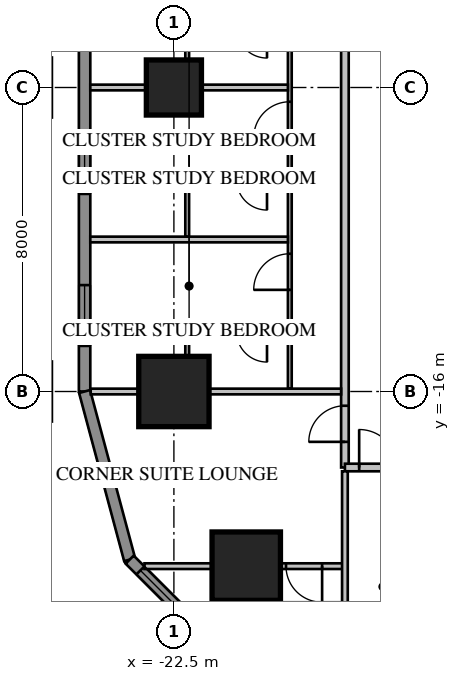
"""IFC4 building model, lengths in metres.
Left out: names, types, materials, properties, quantities, classifications, styles, units other than length and angle.
Written with IfcOpenShell. Run it as: python <this file> out.ifc"""

import sys

from ifc_helpers import new_model, si_unit, direction, frame, frame_2d, origin, origin_2d, place, context, subcontext, project, spatial, rectangle, extrude, element, fill, save


model = new_model("IFC4")
c1 = context("Model", 3, precision=1e-05, world=origin(), true_north=direction((0.0, 1.0)))
c2 = subcontext(c1, "Body", "Model", "MODEL_VIEW")
j1 = project(units=[si_unit("LENGTHUNIT", "METRE"), si_unit("PLANEANGLEUNIT", "RADIAN")], contexts=[c1])
p1 = place(None, origin())
s1 = spatial("IfcSite", under=j1, at=p1, CompositionType="ELEMENT")
p2 = place(p1, origin())
s2 = spatial("IfcBuilding", under=s1, at=p2, CompositionType="ELEMENT")
p3 = place(p2, frame((0.0, 0.0, 23.7)))
s3 = spatial("IfcBuildingStorey", under=s2, at=p3, CompositionType="ELEMENT", Elevation=23.7)
p4 = place(p3, frame((-22.5, -8.0, 0.0), z_axis=(0.0, 0.0, 1.0), x_axis=(1.0, 0.0, 0.0)))
e1 = element("IfcColumn", 1, at=p4, inside=s3, PredefinedType="COLUMN", context=c2, shape_type="SweptSolid", body=[
    extrude(rectangle(XDim=1.45, YDim=1.45, at=origin_2d()), origin(), (0.0, 0.0, 1.0), 3.85),
])
p5 = place(p3, frame((-22.5, -16.0, 0.0), z_axis=(0.0, 0.0, 1.0), x_axis=(1.0, 0.0, 0.0)))
e2 = element("IfcColumn", 2, at=p5, inside=s3, PredefinedType="COLUMN", context=c2, shape_type="SweptSolid", body=[
    extrude(rectangle(XDim=1.85, YDim=1.85, at=origin_2d()), origin(), (0.0, 0.0, 1.0), 3.85),
])
p6 = place(p3, frame((-20.596, -20.596, 0.0), z_axis=(0.0, 0.0, 1.0), x_axis=(1.0, 0.0, 0.0)))
e3 = element("IfcColumn", 3, at=p6, inside=s3, PredefinedType="COLUMN", context=c2, shape_type="SweptSolid", body=[
    extrude(rectangle(XDim=1.8, YDim=1.8, at=origin_2d()), origin(), (0.0, 0.0, 1.0), 3.85),
])
p7 = place(p3, frame((-24.85, 16.0, 0.0), z_axis=(0.0, 0.0, 1.0), x_axis=(0.0, -1.0, 0.0)))
e4 = element("IfcWall", 4, at=p7, inside=s3, PredefinedType="SOLIDWALL", context=c2, shape_type="SweptSolid", body=[
    extrude(rectangle(XDim=32.0, YDim=0.3, at=frame_2d((16.0, 0.0))), origin(), (0.0, 0.0, 1.0), 3.65),
])
p8 = place(p7, frame((1.2, 0.0, 0.75)))
e5 = element("IfcOpeningElement", 5, at=p8, cuts=e4, PredefinedType="OPENING", context=c2, shape_type="SweptSolid", body=[
    extrude(rectangle(XDim=1.6, YDim=1.8, at=frame_2d((0.8, 0.9))), frame((0.0, 0.17, 0.0), z_axis=(0.0, -1.0, 0.0), x_axis=(1.0, 0.0, 0.0)), (0.0, 0.0, 1.0), 0.34),
])
p9 = place(p7, frame((5.2, 0.0, 0.75)))
e6 = element("IfcOpeningElement", 6, at=p9, cuts=e4, PredefinedType="OPENING", context=c2, shape_type="SweptSolid", body=[
    extrude(rectangle(XDim=1.6, YDim=1.8, at=frame_2d((0.8, 0.9))), frame((0.0, 0.17, 0.0), z_axis=(0.0, -1.0, 0.0), x_axis=(1.0, 0.0, 0.0)), (0.0, 0.0, 1.0), 0.34),
])
p10 = place(p7, frame((17.2, 0.0, 0.75)))
e7 = element("IfcOpeningElement", 7, at=p10, cuts=e4, PredefinedType="OPENING", context=c2, shape_type="SweptSolid", body=[
    extrude(rectangle(XDim=1.6, YDim=1.8, at=frame_2d((0.8, 0.9))), frame((0.0, 0.17, 0.0), z_axis=(0.0, -1.0, 0.0), x_axis=(1.0, 0.0, 0.0)), (0.0, 0.0, 1.0), 0.34),
])
p11 = place(p7, frame((21.2, 0.0, 0.75)))
e8 = element("IfcOpeningElement", 8, at=p11, cuts=e4, PredefinedType="OPENING", context=c2, shape_type="SweptSolid", body=[
    extrude(rectangle(XDim=1.6, YDim=1.8, at=frame_2d((0.8, 0.9))), frame((0.0, 0.17, 0.0), z_axis=(0.0, -1.0, 0.0), x_axis=(1.0, 0.0, 0.0)), (0.0, 0.0, 1.0), 0.34),
])
p12 = place(p7, frame((25.2, 0.0, 0.75)))
e9 = element("IfcOpeningElement", 9, at=p12, cuts=e4, PredefinedType="OPENING", context=c2, shape_type="SweptSolid", body=[
    extrude(rectangle(XDim=1.6, YDim=1.8, at=frame_2d((0.8, 0.9))), frame((0.0, 0.17, 0.0), z_axis=(0.0, -1.0, 0.0), x_axis=(1.0, 0.0, 0.0)), (0.0, 0.0, 1.0), 0.34),
])
p13 = place(p7, frame((29.2, 0.0, 0.75)))
e10 = element("IfcOpeningElement", 10, at=p13, cuts=e4, PredefinedType="OPENING", context=c2, shape_type="SweptSolid", body=[
    extrude(rectangle(XDim=1.6, YDim=1.8, at=frame_2d((0.8, 0.9))), frame((0.0, 0.17, 0.0), z_axis=(0.0, -1.0, 0.0), x_axis=(1.0, 0.0, 0.0)), (0.0, 0.0, 1.0), 0.34),
])
p14 = place(p7, frame((8.8, 0.0, 0.75)))
e11 = element("IfcOpeningElement", 11, at=p14, cuts=e4, PredefinedType="OPENING", context=c2, shape_type="SweptSolid", body=[
    extrude(rectangle(XDim=2.4, YDim=1.8, at=frame_2d((1.2, 0.9))), frame((0.0, 0.17, 0.0), z_axis=(0.0, -1.0, 0.0), x_axis=(1.0, 0.0, 0.0)), (0.0, 0.0, 1.0), 0.34),
])
p15 = place(p7, frame((13.812, 0.0, 0.0)))
e12 = element("IfcOpeningElement", 12, at=p15, cuts=e4, PredefinedType="OPENING", context=c2, shape_type="SweptSolid", body=[
    extrude(rectangle(XDim=1.0, YDim=2.4, at=frame_2d((0.5, 1.2))), frame((0.0, 0.17, 0.0), z_axis=(0.0, -1.0, 0.0), x_axis=(1.0, 0.0, 0.0)), (0.0, 0.0, 1.0), 0.34),
])
p16 = place(p3, frame((-24.85, -16.0, 0.0), z_axis=(0.0, 0.0, 1.0), x_axis=(0.258839972501, -0.965920218567, 0.0)))
e13 = element("IfcWall", 13, at=p16, inside=s3, PredefinedType="SOLIDWALL", context=c2, shape_type="SweptSolid", body=[
    extrude(rectangle(XDim=4.581, YDim=0.3, at=frame_2d((2.291, 0.0))), origin(), (0.0, 0.0, 1.0), 3.65),
])
p17 = place(p3, frame((-23.664, -20.425, 0.0), z_axis=(0.0, 0.0, 1.0), x_axis=(0.707106781187, -0.707106781187, 0.0)))
e14 = element("IfcWall", 14, at=p17, inside=s3, PredefinedType="SOLIDWALL", context=c2, shape_type="SweptSolid", body=[
    extrude(rectangle(XDim=4.581, YDim=0.3, at=frame_2d((2.291, 0.0))), origin(), (0.0, 0.0, 1.0), 3.65),
])
p18 = place(p17, frame((0.4, 0.0, 0.75)))
e15 = element("IfcOpeningElement", 15, at=p18, cuts=e14, PredefinedType="OPENING", context=c2, shape_type="SweptSolid", body=[
    extrude(rectangle(XDim=3.781, YDim=1.8, at=frame_2d((1.891, 0.9))), frame((0.0, 0.17, 0.0), z_axis=(0.0, -1.0, 0.0), x_axis=(1.0, 0.0, 0.0)), (0.0, 0.0, 1.0), 0.34),
])
p19 = place(p3, frame((-18.0, 18.0, 0.0), z_axis=(0.0, 0.0, 1.0), x_axis=(0.0, -1.0, 0.0)))
e16 = element("IfcWall", 16, at=p19, inside=s3, PredefinedType="PARTITIONING", context=c2, shape_type="SweptSolid", body=[
    extrude(rectangle(XDim=36.0, YDim=0.2, at=frame_2d((18.0, 0.0))), origin(), (0.0, 0.0, 1.0), 3.65),
])
p20 = place(p19, frame((10.4, 0.0, 0.0)))
e17 = element("IfcOpeningElement", 17, at=p20, cuts=e16, PredefinedType="OPENING", context=c2, shape_type="SweptSolid", body=[
    extrude(rectangle(XDim=1.0, YDim=2.1, at=frame_2d((0.5, 1.05))), frame((0.0, 0.12, 0.0), z_axis=(0.0, -1.0, 0.0), x_axis=(1.0, 0.0, 0.0)), (0.0, 0.0, 1.0), 0.24),
])
p21 = place(p19, frame((14.4, 0.0, 0.0)))
e18 = element("IfcOpeningElement", 18, at=p21, cuts=e16, PredefinedType="OPENING", context=c2, shape_type="SweptSolid", body=[
    extrude(rectangle(XDim=1.0, YDim=2.1, at=frame_2d((0.5, 1.05))), frame((0.0, 0.12, 0.0), z_axis=(0.0, -1.0, 0.0), x_axis=(1.0, 0.0, 0.0)), (0.0, 0.0, 1.0), 0.24),
])
p22 = place(p19, frame((0.375, 0.0, 0.0)))
e19 = element("IfcOpeningElement", 19, at=p22, cuts=e16, PredefinedType="OPENING", context=c2, shape_type="SweptSolid", body=[
    extrude(rectangle(XDim=1.0, YDim=2.1, at=frame_2d((0.5, 1.05))), frame((0.0, 0.12, 0.0), z_axis=(0.0, -1.0, 0.0), x_axis=(1.0, 0.0, 0.0)), (0.0, 0.0, 1.0), 0.24),
])
p23 = place(p19, frame((34.375, 0.0, 0.0)))
e20 = element("IfcOpeningElement", 20, at=p23, cuts=e16, PredefinedType="OPENING", context=c2, shape_type="SweptSolid", body=[
    extrude(rectangle(XDim=0.95, YDim=2.1, at=frame_2d((0.475, 1.05))), frame((0.0, 0.12, 0.0), z_axis=(0.0, -1.0, 0.0), x_axis=(1.0, 0.0, 0.0)), (0.0, 0.0, 1.0), 0.24),
])
p24 = place(p3, frame((-19.45, 3.925, 0.0), z_axis=(0.0, 0.0, 1.0), x_axis=(0.0, -1.0, 0.0)))
e21 = element("IfcWall", 21, at=p24, inside=s3, PredefinedType="PARTITIONING", context=c2, shape_type="SweptSolid", body=[
    extrude(rectangle(XDim=19.85, YDim=0.1, at=frame_2d((9.925, 0.0))), origin(), (0.0, 0.0, 1.0), 3.65),
])
p25 = place(p24, frame((2.125, 0.0, 0.0)))
e22 = element("IfcOpeningElement", 22, at=p25, cuts=e21, PredefinedType="OPENING", context=c2, shape_type="SweptSolid", body=[
    extrude(rectangle(XDim=1.0, YDim=2.1, at=frame_2d((0.5, 1.05))), frame((0.0, 0.07, 0.0), z_axis=(0.0, -1.0, 0.0), x_axis=(1.0, 0.0, 0.0)), (0.0, 0.0, 1.0), 0.14),
])
p26 = place(p24, frame((0.3, 0.0, 0.0)))
e23 = element("IfcOpeningElement", 23, at=p26, cuts=e21, PredefinedType="OPENING", context=c2, shape_type="SweptSolid", body=[
    extrude(rectangle(XDim=0.8, YDim=2.1, at=frame_2d((0.4, 1.05))), frame((0.0, 0.07, 0.0), z_axis=(0.0, -1.0, 0.0), x_axis=(1.0, 0.0, 0.0)), (0.0, 0.0, 1.0), 0.14),
])
p27 = place(p24, frame((4.3, 0.0, 0.0)))
e24 = element("IfcOpeningElement", 24, at=p27, cuts=e21, PredefinedType="OPENING", context=c2, shape_type="SweptSolid", body=[
    extrude(rectangle(XDim=0.95, YDim=2.1, at=frame_2d((0.475, 1.05))), frame((0.0, 0.07, 0.0), z_axis=(0.0, -1.0, 0.0), x_axis=(1.0, 0.0, 0.0)), (0.0, 0.0, 1.0), 0.14),
])
p28 = place(p24, frame((8.3, 0.0, 0.0)))
e25 = element("IfcOpeningElement", 25, at=p28, cuts=e21, PredefinedType="OPENING", context=c2, shape_type="SweptSolid", body=[
    extrude(rectangle(XDim=0.95, YDim=2.1, at=frame_2d((0.475, 1.05))), frame((0.0, 0.07, 0.0), z_axis=(0.0, -1.0, 0.0), x_axis=(1.0, 0.0, 0.0)), (0.0, 0.0, 1.0), 0.14),
])
p29 = place(p24, frame((12.3, 0.0, 0.0)))
e26 = element("IfcOpeningElement", 26, at=p29, cuts=e21, PredefinedType="OPENING", context=c2, shape_type="SweptSolid", body=[
    extrude(rectangle(XDim=0.95, YDim=2.1, at=frame_2d((0.475, 1.05))), frame((0.0, 0.07, 0.0), z_axis=(0.0, -1.0, 0.0), x_axis=(1.0, 0.0, 0.0)), (0.0, 0.0, 1.0), 0.14),
])
p30 = place(p24, frame((16.3, 0.0, 0.0)))
e27 = element("IfcOpeningElement", 27, at=p30, cuts=e21, PredefinedType="OPENING", context=c2, shape_type="SweptSolid", body=[
    extrude(rectangle(XDim=0.95, YDim=2.1, at=frame_2d((0.475, 1.05))), frame((0.0, 0.07, 0.0), z_axis=(0.0, -1.0, 0.0), x_axis=(1.0, 0.0, 0.0)), (0.0, 0.0, 1.0), 0.14),
])
for number, where, z_axis, x_axis in (
    (28, (-19.5, -8.0, 0.0), (0.0, 0.0, 1.0), (-1.0, 0.0, 0.0)),
    (29, (-19.5, -12.0, 0.0), (0.0, 0.0, 1.0), (-1.0, 0.0, 0.0)),
):
    element("IfcWall", number, at=place(p3, frame(where, z_axis=z_axis, x_axis=x_axis)), inside=s3, PredefinedType="PARTITIONING", context=c2, shape_type="SweptSolid", body=[
        extrude(rectangle(XDim=5.2, YDim=0.15, at=frame_2d((2.6, 0.0))), origin(), (0.0, 0.0, 1.0), 3.65),
    ])
p31 = place(p3, frame((-18.1, -16.0, 0.0), z_axis=(0.0, 0.0, 1.0), x_axis=(-1.0, 0.0, 0.0)))
e30 = element("IfcWall", 30, at=p31, inside=s3, PredefinedType="PARTITIONING", context=c2, shape_type="SweptSolid", body=[
    extrude(rectangle(XDim=6.589, YDim=0.15, at=frame_2d((3.295, 0.0))), origin(), (0.0, 0.0, 1.0), 3.65),
])
p32 = place(p3, frame((-22.15, -6.475, 0.0), z_axis=(0.0, 0.0, 1.0), x_axis=(0.0, -1.0, 0.0)))
e31 = element("IfcWall", 31, at=p32, inside=s3, PredefinedType="PARTITIONING", context=c2, shape_type="SweptSolid", body=[
    extrude(rectangle(XDim=1.45, YDim=0.1, at=frame_2d((0.725, 0.0))), origin(), (0.0, 0.0, 1.0), 3.65),
])
p33 = place(p3, frame((-19.5, -10.425, 0.0), z_axis=(0.0, 0.0, 1.0), x_axis=(-1.0, 0.0, 0.0)))
e32 = element("IfcWall", 32, at=p33, inside=s3, PredefinedType="PARTITIONING", context=c2, shape_type="SweptSolid", body=[
    extrude(rectangle(XDim=2.7, YDim=0.1, at=frame_2d((1.35, 0.0))), origin(), (0.0, 0.0, 1.0), 3.65),
])
p34 = place(p33, frame((0.55, 0.0, 0.0)))
e33 = element("IfcOpeningElement", 33, at=p34, cuts=e32, PredefinedType="OPENING", context=c2, shape_type="SweptSolid", body=[
    extrude(rectangle(XDim=0.8, YDim=2.1, at=frame_2d((0.4, 1.05))), frame((0.0, 0.07, 0.0), z_axis=(0.0, -1.0, 0.0), x_axis=(1.0, 0.0, 0.0)), (0.0, 0.0, 1.0), 0.14),
])
p35 = place(p3, frame((-22.15, -10.475, 0.0), z_axis=(0.0, 0.0, 1.0), x_axis=(0.0, -1.0, 0.0)))
e34 = element("IfcWall", 34, at=p35, inside=s3, PredefinedType="PARTITIONING", context=c2, shape_type="SweptSolid", body=[
    extrude(rectangle(XDim=1.45, YDim=0.1, at=frame_2d((0.725, 0.0))), origin(), (0.0, 0.0, 1.0), 3.65),
])
p36 = place(p3, frame((-19.5, -14.425, 0.0), z_axis=(0.0, 0.0, 1.0), x_axis=(-1.0, 0.0, 0.0)))
e35 = element("IfcWall", 35, at=p36, inside=s3, PredefinedType="PARTITIONING", context=c2, shape_type="SweptSolid", body=[
    extrude(rectangle(XDim=2.7, YDim=0.1, at=frame_2d((1.35, 0.0))), origin(), (0.0, 0.0, 1.0), 3.65),
])
p37 = place(p36, frame((0.55, 0.0, 0.0)))
e36 = element("IfcOpeningElement", 36, at=p37, cuts=e35, PredefinedType="OPENING", context=c2, shape_type="SweptSolid", body=[
    extrude(rectangle(XDim=0.8, YDim=2.1, at=frame_2d((0.4, 1.05))), frame((0.0, 0.07, 0.0), z_axis=(0.0, -1.0, 0.0), x_axis=(1.0, 0.0, 0.0)), (0.0, 0.0, 1.0), 0.14),
])
p38 = place(p3, frame((-22.15, -14.475, 0.0), z_axis=(0.0, 0.0, 1.0), x_axis=(0.0, -1.0, 0.0)))
e37 = element("IfcWall", 37, at=p38, inside=s3, PredefinedType="PARTITIONING", context=c2, shape_type="SweptSolid", body=[
    extrude(rectangle(XDim=1.45, YDim=0.1, at=frame_2d((0.725, 0.0))), origin(), (0.0, 0.0, 1.0), 3.65),
])
p39 = place(p3, frame((-18.065, -20.596, 0.0), z_axis=(0.0, 0.0, 1.0), x_axis=(-1.0, 0.0, 0.0)))
e38 = element("IfcWall", 38, at=p39, inside=s3, PredefinedType="PARTITIONING", context=c2, shape_type="SweptSolid", body=[
    extrude(rectangle(XDim=5.209, YDim=0.15, at=frame_2d((2.604, 0.0))), origin(), (0.0, 0.0, 1.0), 3.65),
])
p40 = place(p39, frame((0.535, 0.0, 0.0)))
e39 = element("IfcOpeningElement", 39, at=p40, cuts=e38, PredefinedType="OPENING", context=c2, shape_type="SweptSolid", body=[
    extrude(rectangle(XDim=0.95, YDim=2.1, at=frame_2d((0.475, 1.05))), frame((0.0, 0.095, 0.0), z_axis=(0.0, -1.0, 0.0), x_axis=(1.0, 0.0, 0.0)), (0.0, 0.0, 1.0), 0.19),
])
p41 = place(p3, frame((-18.0, -18.0, 0.0), z_axis=(0.0, 0.0, 1.0), x_axis=(1.0, 0.0, 0.0)))
e40 = element("IfcWall", 40, at=p41, inside=s3, PredefinedType="PARTITIONING", context=c2, shape_type="SweptSolid", body=[
    extrude(rectangle(XDim=36.0, YDim=0.2, at=frame_2d((18.0, 0.0))), origin(), (0.0, 0.0, 1.0), 3.65),
])
p42 = place(p41, frame((0.375, 0.0, 0.0)))
e41 = element("IfcOpeningElement", 41, at=p42, cuts=e40, PredefinedType="OPENING", context=c2, shape_type="SweptSolid", body=[
    extrude(rectangle(XDim=1.0, YDim=2.1, at=frame_2d((0.5, 1.05))), frame((0.0, 0.12, 0.0), z_axis=(0.0, -1.0, 0.0), x_axis=(1.0, 0.0, 0.0)), (0.0, 0.0, 1.0), 0.24),
])
p43 = place(p41, frame((2.45, 0.0, 0.0)))
e42 = element("IfcOpeningElement", 42, at=p43, cuts=e40, PredefinedType="OPENING", context=c2, shape_type="SweptSolid", body=[
    extrude(rectangle(XDim=0.8, YDim=2.1, at=frame_2d((0.4, 1.05))), frame((0.0, 0.12, 0.0), z_axis=(0.0, -1.0, 0.0), x_axis=(1.0, 0.0, 0.0)), (0.0, 0.0, 1.0), 0.24),
])
p44 = place(p41, frame((4.05, 0.0, 0.0)))
e43 = element("IfcOpeningElement", 43, at=p44, cuts=e40, PredefinedType="OPENING", context=c2, shape_type="SweptSolid", body=[
    extrude(rectangle(XDim=1.0, YDim=2.1, at=frame_2d((0.5, 1.05))), frame((0.0, 0.12, 0.0), z_axis=(0.0, -1.0, 0.0), x_axis=(1.0, 0.0, 0.0)), (0.0, 0.0, 1.0), 0.24),
])
p45 = place(p41, frame((6.45, 0.0, 0.0)))
e44 = element("IfcOpeningElement", 44, at=p45, cuts=e40, PredefinedType="OPENING", context=c2, shape_type="SweptSolid", body=[
    extrude(rectangle(XDim=0.9, YDim=2.1, at=frame_2d((0.45, 1.05))), frame((0.0, 0.12, 0.0), z_axis=(0.0, -1.0, 0.0), x_axis=(1.0, 0.0, 0.0)), (0.0, 0.0, 1.0), 0.24),
])
p46 = place(p41, frame((8.15, 0.0, 0.0)))
e45 = element("IfcOpeningElement", 45, at=p46, cuts=e40, PredefinedType="OPENING", context=c2, shape_type="SweptSolid", body=[
    extrude(rectangle(XDim=1.0, YDim=2.1, at=frame_2d((0.5, 1.05))), frame((0.0, 0.12, 0.0), z_axis=(0.0, -1.0, 0.0), x_axis=(1.0, 0.0, 0.0)), (0.0, 0.0, 1.0), 0.24),
])
p47 = place(p41, frame((19.8, 0.0, 0.0)))
e46 = element("IfcOpeningElement", 46, at=p47, cuts=e40, PredefinedType="OPENING", context=c2, shape_type="SweptSolid", body=[
    extrude(rectangle(XDim=0.95, YDim=2.1, at=frame_2d((0.475, 1.05))), frame((0.0, 0.12, 0.0), z_axis=(0.0, -1.0, 0.0), x_axis=(1.0, 0.0, 0.0)), (0.0, 0.0, 1.0), 0.24),
])
p48 = place(p41, frame((23.8, 0.0, 0.0)))
e47 = element("IfcOpeningElement", 47, at=p48, cuts=e40, PredefinedType="OPENING", context=c2, shape_type="SweptSolid", body=[
    extrude(rectangle(XDim=0.95, YDim=2.1, at=frame_2d((0.475, 1.05))), frame((0.0, 0.12, 0.0), z_axis=(0.0, -1.0, 0.0), x_axis=(1.0, 0.0, 0.0)), (0.0, 0.0, 1.0), 0.24),
])
p49 = place(p41, frame((27.8, 0.0, 0.0)))
e48 = element("IfcOpeningElement", 48, at=p49, cuts=e40, PredefinedType="OPENING", context=c2, shape_type="SweptSolid", body=[
    extrude(rectangle(XDim=0.95, YDim=2.1, at=frame_2d((0.475, 1.05))), frame((0.0, 0.12, 0.0), z_axis=(0.0, -1.0, 0.0), x_axis=(1.0, 0.0, 0.0)), (0.0, 0.0, 1.0), 0.24),
])
p50 = place(p41, frame((31.8, 0.0, 0.0)))
e49 = element("IfcOpeningElement", 49, at=p50, cuts=e40, PredefinedType="OPENING", context=c2, shape_type="SweptSolid", body=[
    extrude(rectangle(XDim=0.95, YDim=2.1, at=frame_2d((0.475, 1.05))), frame((0.0, 0.12, 0.0), z_axis=(0.0, -1.0, 0.0), x_axis=(1.0, 0.0, 0.0)), (0.0, 0.0, 1.0), 0.24),
])
p51 = place(p41, frame((34.375, 0.0, 0.0)))
e50 = element("IfcOpeningElement", 50, at=p51, cuts=e40, PredefinedType="OPENING", context=c2, shape_type="SweptSolid", body=[
    extrude(rectangle(XDim=0.95, YDim=2.1, at=frame_2d((0.475, 1.05))), frame((0.0, 0.12, 0.0), z_axis=(0.0, -1.0, 0.0), x_axis=(1.0, 0.0, 0.0)), (0.0, 0.0, 1.0), 0.24),
])
p52 = place(p41, frame((11.2, 0.0, 0.0)))
e51 = element("IfcOpeningElement", 51, at=p52, cuts=e40, PredefinedType="OPENING", context=c2, shape_type="SweptSolid", body=[
    extrude(rectangle(XDim=1.0, YDim=2.1, at=frame_2d((0.5, 1.05))), frame((0.0, 0.12, 0.0), z_axis=(0.0, -1.0, 0.0), x_axis=(1.0, 0.0, 0.0)), (0.0, 0.0, 1.0), 0.24),
])
p53 = place(p3, frame((-18.0, -18.1, 0.0), z_axis=(0.0, 0.0, 1.0), x_axis=(0.0, -1.0, 0.0)))
e52 = element("IfcWall", 52, at=p53, inside=s3, PredefinedType="PARTITIONING", context=c2, shape_type="SweptSolid", body=[
    extrude(rectangle(XDim=6.053, YDim=0.15, at=frame_2d((3.027, 0.0))), origin(), (0.0, 0.0, 1.0), 3.65),
])
p54 = place(p12, origin())
e53 = element("IfcWindow", 53, at=p54, inside=s3, PartitioningType="SINGLE_PANEL", PredefinedType="WINDOW", context=c2, shape_type="SweptSolid", body=[
    extrude(rectangle(XDim=1.6, YDim=1.8, at=frame_2d((0.8, 0.9))), frame((0.0, 0.03, 0.0), z_axis=(0.0, -1.0, 0.0), x_axis=(1.0, 0.0, 0.0)), (0.0, 0.0, 1.0), 0.06),
])
fill(e9, e53)
p55 = place(p13, origin())
e54 = element("IfcWindow", 54, at=p55, inside=s3, PartitioningType="SINGLE_PANEL", PredefinedType="WINDOW", context=c2, shape_type="SweptSolid", body=[
    extrude(rectangle(XDim=1.6, YDim=1.8, at=frame_2d((0.8, 0.9))), frame((0.0, 0.03, 0.0), z_axis=(0.0, -1.0, 0.0), x_axis=(1.0, 0.0, 0.0)), (0.0, 0.0, 1.0), 0.06),
])
fill(e10, e54)
p56 = place(p18, origin())
e55 = element("IfcWindow", 55, at=p56, inside=s3, PartitioningType="SINGLE_PANEL", PredefinedType="WINDOW", context=c2, shape_type="SweptSolid", body=[
    extrude(rectangle(XDim=3.781, YDim=1.8, at=frame_2d((1.891, 0.9))), frame((0.0, 0.03, 0.0), z_axis=(0.0, -1.0, 0.0), x_axis=(1.0, 0.0, 0.0)), (0.0, 0.0, 1.0), 0.06),
])
fill(e15, e55)
p57 = place(p29, origin())
e56 = element("IfcDoor", 56, at=p57, inside=s3, OperationType="SINGLE_SWING_RIGHT", PredefinedType="DOOR", context=c2, shape_type="SweptSolid", body=[
    extrude(rectangle(XDim=0.95, YDim=2.1, at=frame_2d((0.475, 1.05))), frame((0.0, 0.025, 0.0), z_axis=(0.0, -1.0, 0.0), x_axis=(1.0, 0.0, 0.0)), (0.0, 0.0, 1.0), 0.05),
])
fill(e26, e56)
p58 = place(p34, origin())
e57 = element("IfcDoor", 57, at=p58, inside=s3, OperationType="SINGLE_SWING_LEFT", PredefinedType="DOOR", context=c2, shape_type="SweptSolid", body=[
    extrude(rectangle(XDim=0.8, YDim=2.1, at=frame_2d((0.4, 1.05))), frame((0.0, 0.025, 0.0), z_axis=(0.0, -1.0, 0.0), x_axis=(1.0, 0.0, 0.0)), (0.0, 0.0, 1.0), 0.05),
])
fill(e33, e57)
p59 = place(p30, origin())
e58 = element("IfcDoor", 58, at=p59, inside=s3, OperationType="SINGLE_SWING_RIGHT", PredefinedType="DOOR", context=c2, shape_type="SweptSolid", body=[
    extrude(rectangle(XDim=0.95, YDim=2.1, at=frame_2d((0.475, 1.05))), frame((0.0, 0.025, 0.0), z_axis=(0.0, -1.0, 0.0), x_axis=(1.0, 0.0, 0.0)), (0.0, 0.0, 1.0), 0.05),
])
fill(e27, e58)
p60 = place(p37, origin())
e59 = element("IfcDoor", 59, at=p60, inside=s3, OperationType="SINGLE_SWING_LEFT", PredefinedType="DOOR", context=c2, shape_type="SweptSolid", body=[
    extrude(rectangle(XDim=0.8, YDim=2.1, at=frame_2d((0.4, 1.05))), frame((0.0, 0.025, 0.0), z_axis=(0.0, -1.0, 0.0), x_axis=(1.0, 0.0, 0.0)), (0.0, 0.0, 1.0), 0.05),
])
fill(e36, e59)
p61 = place(p23, origin())
e60 = element("IfcDoor", 60, at=p61, inside=s3, OperationType="SINGLE_SWING_RIGHT", PredefinedType="DOOR", context=c2, shape_type="SweptSolid", body=[
    extrude(rectangle(XDim=0.95, YDim=2.1, at=frame_2d((0.475, 1.05))), frame((0.0, 0.025, 0.0), z_axis=(0.0, -1.0, 0.0), x_axis=(1.0, 0.0, 0.0)), (0.0, 0.0, 1.0), 0.05),
])
fill(e20, e60)
p62 = place(p40, origin())
e61 = element("IfcDoor", 61, at=p62, inside=s3, OperationType="SINGLE_SWING_LEFT", PredefinedType="DOOR", context=c2, shape_type="SweptSolid", body=[
    extrude(rectangle(XDim=0.95, YDim=2.1, at=frame_2d((0.475, 1.05))), frame((0.0, 0.025, 0.0), z_axis=(0.0, -1.0, 0.0), x_axis=(1.0, 0.0, 0.0)), (0.0, 0.0, 1.0), 0.05),
])
fill(e39, e61)
p63 = place(p42, origin())
e62 = element("IfcDoor", 62, at=p63, inside=s3, OperationType="SINGLE_SWING_LEFT", PredefinedType="DOOR", context=c2, shape_type="SweptSolid", body=[
    extrude(rectangle(XDim=1.0, YDim=2.1, at=frame_2d((0.5, 1.05))), frame((0.0, 0.025, 0.0), z_axis=(0.0, -1.0, 0.0), x_axis=(1.0, 0.0, 0.0)), (0.0, 0.0, 1.0), 0.05),
])
fill(e41, e62)
save(model, sys.argv[1])
